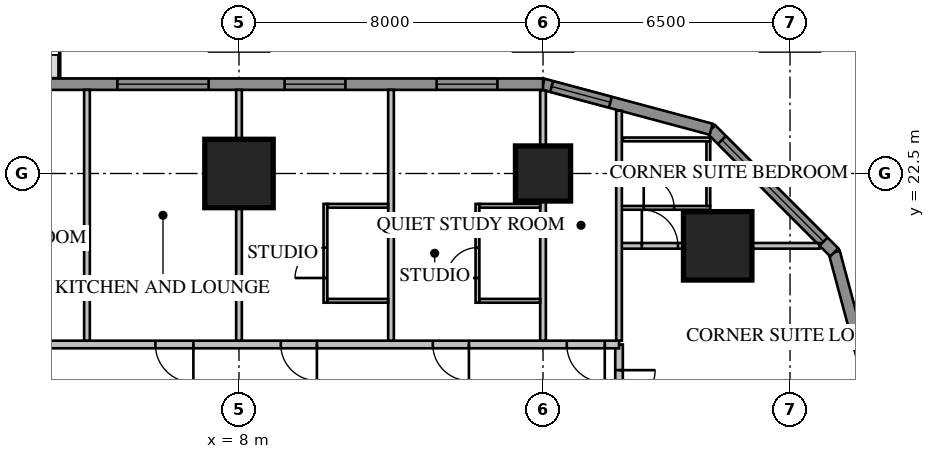
"""IFC4 building model, lengths in metres.
Left out: names, types, materials, properties, quantities, classifications, styles, units other than length and angle.
Written with IfcOpenShell. Run it as: python <this file> out.ifc"""

import sys

from ifc_helpers import new_model, si_unit, direction, frame, frame_2d, origin, origin_2d, place, context, subcontext, project, spatial, rectangle, extrude, element, fill, save


model = new_model("IFC4")
c1 = context("Model", 3, precision=1e-05, world=origin(), true_north=direction((0.0, 1.0)))
c2 = subcontext(c1, "Body", "Model", "MODEL_VIEW")
j1 = project(units=[si_unit("LENGTHUNIT", "METRE"), si_unit("PLANEANGLEUNIT", "RADIAN")], contexts=[c1])
p1 = place(None, origin())
s1 = spatial("IfcSite", under=j1, at=p1, CompositionType="ELEMENT")
p2 = place(p1, origin())
s2 = spatial("IfcBuilding", under=s1, at=p2, CompositionType="ELEMENT")
p3 = place(p2, frame((0.0, 0.0, 50.65)))
s3 = spatial("IfcBuildingStorey", under=s2, at=p3, CompositionType="ELEMENT", Elevation=50.65)
p4 = place(p3, frame((20.596, 20.596, 0.0), z_axis=(0.0, 0.0, 1.0), x_axis=(1.0, 0.0, 0.0)))
e1 = element("IfcColumn", 1, at=p4, inside=s3, PredefinedType="COLUMN", context=c2, shape_type="SweptSolid", body=[
    extrude(rectangle(XDim=1.8, YDim=1.8, at=origin_2d()), origin(), (0.0, 0.0, 1.0), 3.413),
])
p5 = place(p3, frame((16.0, 22.5, 0.0), z_axis=(0.0, 0.0, 1.0), x_axis=(1.0, 0.0, 0.0)))
e2 = element("IfcColumn", 2, at=p5, inside=s3, PredefinedType="COLUMN", context=c2, shape_type="SweptSolid", body=[
    extrude(rectangle(XDim=1.45, YDim=1.45, at=origin_2d()), origin(), (0.0, 0.0, 1.0), 3.413),
])
p6 = place(p3, frame((8.0, 22.5, 0.0), z_axis=(0.0, 0.0, 1.0), x_axis=(1.0, 0.0, 0.0)))
e3 = element("IfcColumn", 3, at=p6, inside=s3, PredefinedType="COLUMN", context=c2, shape_type="SweptSolid", body=[
    extrude(rectangle(XDim=1.8, YDim=1.8, at=origin_2d()), origin(), (0.0, 0.0, 1.0), 3.413),
])
p7 = place(p3, frame((24.85, 16.0, 0.0), z_axis=(0.0, 0.0, 1.0), x_axis=(-0.258839972501, 0.965920218567, 0.0)))
e4 = element("IfcWall", 4, at=p7, inside=s3, PredefinedType="SOLIDWALL", context=c2, shape_type="SweptSolid", body=[
    extrude(rectangle(XDim=4.581, YDim=0.3, at=frame_2d((2.291, 0.0))), origin(), (0.0, 0.0, 1.0), 3.65),
])
p8 = place(p3, frame((23.664, 20.425, 0.0), z_axis=(0.0, 0.0, 1.0), x_axis=(-0.707106781187, 0.707106781187, 0.0)))
e5 = element("IfcWall", 5, at=p8, inside=s3, PredefinedType="SOLIDWALL", context=c2, shape_type="SweptSolid", body=[
    extrude(rectangle(XDim=4.581, YDim=0.3, at=frame_2d((2.291, 0.0))), origin(), (0.0, 0.0, 1.0), 3.65),
])
p9 = place(p8, frame((0.4, 0.0, 0.75)))
e6 = element("IfcOpeningElement", 6, at=p9, cuts=e5, PredefinedType="OPENING", context=c2, shape_type="SweptSolid", body=[
    extrude(rectangle(XDim=3.781, YDim=1.8, at=frame_2d((1.891, 0.9))), frame((0.0, 0.17, 0.0), z_axis=(0.0, -1.0, 0.0), x_axis=(1.0, 0.0, 0.0)), (0.0, 0.0, 1.0), 0.34),
])
p10 = place(p3, frame((20.425, 23.664, 0.0), z_axis=(0.0, 0.0, 1.0), x_axis=(-0.965920218567, 0.258839972501, 0.0)))
e7 = element("IfcWall", 7, at=p10, inside=s3, PredefinedType="SOLIDWALL", context=c2, shape_type="SweptSolid", body=[
    extrude(rectangle(XDim=4.581, YDim=0.3, at=frame_2d((2.291, 0.0))), origin(), (0.0, 0.0, 1.0), 3.65),
])
p11 = place(p10, frame((2.746, 0.0, 0.75)))
e8 = element("IfcOpeningElement", 8, at=p11, cuts=e7, PredefinedType="OPENING", context=c2, shape_type="SweptSolid", body=[
    extrude(rectangle(XDim=1.6, YDim=1.8, at=frame_2d((0.8, 0.9))), frame((0.0, 0.17, 0.0), z_axis=(0.0, -1.0, 0.0), x_axis=(1.0, 0.0, 0.0)), (0.0, 0.0, 1.0), 0.34),
])
p12 = place(p3, frame((16.0, 24.85, 0.0), z_axis=(0.0, 0.0, 1.0), x_axis=(-1.0, 0.0, 0.0)))
e9 = element("IfcWall", 9, at=p12, inside=s3, PredefinedType="SOLIDWALL", context=c2, shape_type="SweptSolid", body=[
    extrude(rectangle(XDim=32.0, YDim=0.3, at=frame_2d((16.0, 0.0))), origin(), (0.0, 0.0, 1.0), 3.65),
])
p13 = place(p12, frame((1.2, 0.0, 0.75)))
e10 = element("IfcOpeningElement", 10, at=p13, cuts=e9, PredefinedType="OPENING", context=c2, shape_type="SweptSolid", body=[
    extrude(rectangle(XDim=1.6, YDim=1.8, at=frame_2d((0.8, 0.9))), frame((0.0, 0.17, 0.0), z_axis=(0.0, -1.0, 0.0), x_axis=(1.0, 0.0, 0.0)), (0.0, 0.0, 1.0), 0.34),
])
p14 = place(p12, frame((5.2, 0.0, 0.75)))
e11 = element("IfcOpeningElement", 11, at=p14, cuts=e9, PredefinedType="OPENING", context=c2, shape_type="SweptSolid", body=[
    extrude(rectangle(XDim=1.6, YDim=1.8, at=frame_2d((0.8, 0.9))), frame((0.0, 0.17, 0.0), z_axis=(0.0, -1.0, 0.0), x_axis=(1.0, 0.0, 0.0)), (0.0, 0.0, 1.0), 0.34),
])
p15 = place(p12, frame((17.2, 0.0, 0.75)))
e12 = element("IfcOpeningElement", 12, at=p15, cuts=e9, PredefinedType="OPENING", context=c2, shape_type="SweptSolid", body=[
    extrude(rectangle(XDim=1.6, YDim=1.8, at=frame_2d((0.8, 0.9))), frame((0.0, 0.17, 0.0), z_axis=(0.0, -1.0, 0.0), x_axis=(1.0, 0.0, 0.0)), (0.0, 0.0, 1.0), 0.34),
])
p16 = place(p12, frame((21.2, 0.0, 0.75)))
e13 = element("IfcOpeningElement", 13, at=p16, cuts=e9, PredefinedType="OPENING", context=c2, shape_type="SweptSolid", body=[
    extrude(rectangle(XDim=1.6, YDim=1.8, at=frame_2d((0.8, 0.9))), frame((0.0, 0.17, 0.0), z_axis=(0.0, -1.0, 0.0), x_axis=(1.0, 0.0, 0.0)), (0.0, 0.0, 1.0), 0.34),
])
p17 = place(p12, frame((25.2, 0.0, 0.75)))
e14 = element("IfcOpeningElement", 14, at=p17, cuts=e9, PredefinedType="OPENING", context=c2, shape_type="SweptSolid", body=[
    extrude(rectangle(XDim=1.6, YDim=1.8, at=frame_2d((0.8, 0.9))), frame((0.0, 0.17, 0.0), z_axis=(0.0, -1.0, 0.0), x_axis=(1.0, 0.0, 0.0)), (0.0, 0.0, 1.0), 0.34),
])
p18 = place(p12, frame((29.2, 0.0, 0.75)))
e15 = element("IfcOpeningElement", 15, at=p18, cuts=e9, PredefinedType="OPENING", context=c2, shape_type="SweptSolid", body=[
    extrude(rectangle(XDim=1.6, YDim=1.8, at=frame_2d((0.8, 0.9))), frame((0.0, 0.17, 0.0), z_axis=(0.0, -1.0, 0.0), x_axis=(1.0, 0.0, 0.0)), (0.0, 0.0, 1.0), 0.34),
])
p19 = place(p12, frame((8.8, 0.0, 0.75)))
e16 = element("IfcOpeningElement", 16, at=p19, cuts=e9, PredefinedType="OPENING", context=c2, shape_type="SweptSolid", body=[
    extrude(rectangle(XDim=2.4, YDim=1.8, at=frame_2d((1.2, 0.9))), frame((0.0, 0.17, 0.0), z_axis=(0.0, -1.0, 0.0), x_axis=(1.0, 0.0, 0.0)), (0.0, 0.0, 1.0), 0.34),
])
p20 = place(p12, frame((13.812, 0.0, 0.0)))
e17 = element("IfcOpeningElement", 17, at=p20, cuts=e9, PredefinedType="OPENING", context=c2, shape_type="SweptSolid", body=[
    extrude(rectangle(XDim=1.0, YDim=2.4, at=frame_2d((0.5, 1.2))), frame((0.0, 0.17, 0.0), z_axis=(0.0, -1.0, 0.0), x_axis=(1.0, 0.0, 0.0)), (0.0, 0.0, 1.0), 0.34),
])
p21 = place(p3, frame((18.0, -18.0, 0.0), z_axis=(0.0, 0.0, 1.0), x_axis=(0.0, 1.0, 0.0)))
e18 = element("IfcWall", 18, at=p21, inside=s3, PredefinedType="PARTITIONING", context=c2, shape_type="SweptSolid", body=[
    extrude(rectangle(XDim=36.0, YDim=0.2, at=frame_2d((18.0, 0.0))), origin(), (0.0, 0.0, 1.0), 3.65),
])
p22 = place(p21, frame((10.4, 0.0, 0.0)))
e19 = element("IfcOpeningElement", 19, at=p22, cuts=e18, PredefinedType="OPENING", context=c2, shape_type="SweptSolid", body=[
    extrude(rectangle(XDim=1.0, YDim=2.1, at=frame_2d((0.5, 1.05))), frame((0.0, 0.12, 0.0), z_axis=(0.0, -1.0, 0.0), x_axis=(1.0, 0.0, 0.0)), (0.0, 0.0, 1.0), 0.24),
])
p23 = place(p21, frame((14.4, 0.0, 0.0)))
e20 = element("IfcOpeningElement", 20, at=p23, cuts=e18, PredefinedType="OPENING", context=c2, shape_type="SweptSolid", body=[
    extrude(rectangle(XDim=1.0, YDim=2.1, at=frame_2d((0.5, 1.05))), frame((0.0, 0.12, 0.0), z_axis=(0.0, -1.0, 0.0), x_axis=(1.0, 0.0, 0.0)), (0.0, 0.0, 1.0), 0.24),
])
p24 = place(p21, frame((0.375, 0.0, 0.0)))
e21 = element("IfcOpeningElement", 21, at=p24, cuts=e18, PredefinedType="OPENING", context=c2, shape_type="SweptSolid", body=[
    extrude(rectangle(XDim=1.0, YDim=2.1, at=frame_2d((0.5, 1.05))), frame((0.0, 0.12, 0.0), z_axis=(0.0, -1.0, 0.0), x_axis=(1.0, 0.0, 0.0)), (0.0, 0.0, 1.0), 0.24),
])
p25 = place(p21, frame((34.375, 0.0, 0.0)))
e22 = element("IfcOpeningElement", 22, at=p25, cuts=e18, PredefinedType="OPENING", context=c2, shape_type="SweptSolid", body=[
    extrude(rectangle(XDim=0.95, YDim=2.1, at=frame_2d((0.475, 1.05))), frame((0.0, 0.12, 0.0), z_axis=(0.0, -1.0, 0.0), x_axis=(1.0, 0.0, 0.0)), (0.0, 0.0, 1.0), 0.24),
])
p26 = place(p3, frame((18.065, 21.596, 0.0), z_axis=(0.0, 0.0, 1.0), x_axis=(1.0, 0.0, 0.0)))
e23 = element("IfcWall", 23, at=p26, inside=s3, PredefinedType="PARTITIONING", context=c2, shape_type="SweptSolid", body=[
    extrude(rectangle(XDim=2.335, YDim=0.1, at=frame_2d((1.167, 0.0))), origin(), (0.0, 0.0, 1.0), 3.65),
])
p27 = place(p26, frame((0.585, 0.0, 0.0)))
e24 = element("IfcOpeningElement", 24, at=p27, cuts=e23, PredefinedType="OPENING", context=c2, shape_type="SweptSolid", body=[
    extrude(rectangle(XDim=0.8, YDim=2.1, at=frame_2d((0.4, 1.05))), frame((0.0, 0.07, 0.0), z_axis=(0.0, -1.0, 0.0), x_axis=(1.0, 0.0, 0.0)), (0.0, 0.0, 1.0), 0.14),
])
p28 = place(p3, frame((20.35, 21.646, 0.0), z_axis=(0.0, 0.0, 1.0), x_axis=(0.0, 1.0, 0.0)))
e25 = element("IfcWall", 25, at=p28, inside=s3, PredefinedType="PARTITIONING", context=c2, shape_type="SweptSolid", body=[
    extrude(rectangle(XDim=1.7, YDim=0.1, at=frame_2d((0.85, 0.0))), origin(), (0.0, 0.0, 1.0), 3.65),
])
p29 = place(p3, frame((18.1, 23.396, 0.0), z_axis=(0.0, 0.0, 1.0), x_axis=(1.0, 0.0, 0.0)))
e26 = element("IfcWall", 26, at=p29, inside=s3, PredefinedType="PARTITIONING", context=c2, shape_type="SweptSolid", body=[
    extrude(rectangle(XDim=2.3, YDim=0.1, at=frame_2d((1.15, 0.0))), origin(), (0.0, 0.0, 1.0), 3.65),
])
p30 = place(p3, frame((18.065, 20.596, 0.0), z_axis=(0.0, 0.0, 1.0), x_axis=(1.0, 0.0, 0.0)))
e27 = element("IfcWall", 27, at=p30, inside=s3, PredefinedType="PARTITIONING", context=c2, shape_type="SweptSolid", body=[
    extrude(rectangle(XDim=5.209, YDim=0.15, at=frame_2d((2.604, 0.0))), origin(), (0.0, 0.0, 1.0), 3.65),
])
p31 = place(p30, frame((0.535, 0.0, 0.0)))
e28 = element("IfcOpeningElement", 28, at=p31, cuts=e27, PredefinedType="OPENING", context=c2, shape_type="SweptSolid", body=[
    extrude(rectangle(XDim=0.95, YDim=2.1, at=frame_2d((0.475, 1.05))), frame((0.0, 0.095, 0.0), z_axis=(0.0, -1.0, 0.0), x_axis=(1.0, 0.0, 0.0)), (0.0, 0.0, 1.0), 0.19),
])
p32 = place(p3, frame((18.0, 18.0, 0.0), z_axis=(0.0, 0.0, 1.0), x_axis=(-1.0, 0.0, 0.0)))
e29 = element("IfcWall", 29, at=p32, inside=s3, PredefinedType="PARTITIONING", context=c2, shape_type="SweptSolid", body=[
    extrude(rectangle(XDim=36.0, YDim=0.2, at=frame_2d((18.0, 0.0))), origin(), (0.0, 0.0, 1.0), 3.65),
])
p33 = place(p32, frame((0.375, 0.0, 0.0)))
e30 = element("IfcOpeningElement", 30, at=p33, cuts=e29, PredefinedType="OPENING", context=c2, shape_type="SweptSolid", body=[
    extrude(rectangle(XDim=1.0, YDim=2.1, at=frame_2d((0.5, 1.05))), frame((0.0, 0.12, 0.0), z_axis=(0.0, -1.0, 0.0), x_axis=(1.0, 0.0, 0.0)), (0.0, 0.0, 1.0), 0.24),
])
p34 = place(p32, frame((3.95, 0.0, 0.0)))
e31 = element("IfcOpeningElement", 31, at=p34, cuts=e29, PredefinedType="OPENING", context=c2, shape_type="SweptSolid", body=[
    extrude(rectangle(XDim=0.95, YDim=2.1, at=frame_2d((0.475, 1.05))), frame((0.0, 0.12, 0.0), z_axis=(0.0, -1.0, 0.0), x_axis=(1.0, 0.0, 0.0)), (0.0, 0.0, 1.0), 0.24),
])
p35 = place(p32, frame((7.95, 0.0, 0.0)))
e32 = element("IfcOpeningElement", 32, at=p35, cuts=e29, PredefinedType="OPENING", context=c2, shape_type="SweptSolid", body=[
    extrude(rectangle(XDim=0.95, YDim=2.1, at=frame_2d((0.475, 1.05))), frame((0.0, 0.12, 0.0), z_axis=(0.0, -1.0, 0.0), x_axis=(1.0, 0.0, 0.0)), (0.0, 0.0, 1.0), 0.24),
])
p36 = place(p32, frame((19.95, 0.0, 0.0)))
e33 = element("IfcOpeningElement", 33, at=p36, cuts=e29, PredefinedType="OPENING", context=c2, shape_type="SweptSolid", body=[
    extrude(rectangle(XDim=0.95, YDim=2.1, at=frame_2d((0.475, 1.05))), frame((0.0, 0.12, 0.0), z_axis=(0.0, -1.0, 0.0), x_axis=(1.0, 0.0, 0.0)), (0.0, 0.0, 1.0), 0.24),
])
p37 = place(p32, frame((23.95, 0.0, 0.0)))
e34 = element("IfcOpeningElement", 34, at=p37, cuts=e29, PredefinedType="OPENING", context=c2, shape_type="SweptSolid", body=[
    extrude(rectangle(XDim=0.95, YDim=2.1, at=frame_2d((0.475, 1.05))), frame((0.0, 0.12, 0.0), z_axis=(0.0, -1.0, 0.0), x_axis=(1.0, 0.0, 0.0)), (0.0, 0.0, 1.0), 0.24),
])
p38 = place(p32, frame((27.95, 0.0, 0.0)))
e35 = element("IfcOpeningElement", 35, at=p38, cuts=e29, PredefinedType="OPENING", context=c2, shape_type="SweptSolid", body=[
    extrude(rectangle(XDim=0.95, YDim=2.1, at=frame_2d((0.475, 1.05))), frame((0.0, 0.12, 0.0), z_axis=(0.0, -1.0, 0.0), x_axis=(1.0, 0.0, 0.0)), (0.0, 0.0, 1.0), 0.24),
])
p39 = place(p32, frame((31.95, 0.0, 0.0)))
e36 = element("IfcOpeningElement", 36, at=p39, cuts=e29, PredefinedType="OPENING", context=c2, shape_type="SweptSolid", body=[
    extrude(rectangle(XDim=0.95, YDim=2.1, at=frame_2d((0.475, 1.05))), frame((0.0, 0.12, 0.0), z_axis=(0.0, -1.0, 0.0), x_axis=(1.0, 0.0, 0.0)), (0.0, 0.0, 1.0), 0.24),
])
p40 = place(p32, frame((34.375, 0.0, 0.0)))
e37 = element("IfcOpeningElement", 37, at=p40, cuts=e29, PredefinedType="OPENING", context=c2, shape_type="SweptSolid", body=[
    extrude(rectangle(XDim=0.95, YDim=2.1, at=frame_2d((0.475, 1.05))), frame((0.0, 0.12, 0.0), z_axis=(0.0, -1.0, 0.0), x_axis=(1.0, 0.0, 0.0)), (0.0, 0.0, 1.0), 0.24),
])
p41 = place(p32, frame((11.2, 0.0, 0.0)))
e38 = element("IfcOpeningElement", 38, at=p41, cuts=e29, PredefinedType="OPENING", context=c2, shape_type="SweptSolid", body=[
    extrude(rectangle(XDim=1.0, YDim=2.1, at=frame_2d((0.5, 1.05))), frame((0.0, 0.12, 0.0), z_axis=(0.0, -1.0, 0.0), x_axis=(1.0, 0.0, 0.0)), (0.0, 0.0, 1.0), 0.24),
])
p42 = place(p32, frame((15.2, 0.0, 0.0)))
e39 = element("IfcOpeningElement", 39, at=p42, cuts=e29, PredefinedType="OPENING", context=c2, shape_type="SweptSolid", body=[
    extrude(rectangle(XDim=1.0, YDim=2.1, at=frame_2d((0.5, 1.05))), frame((0.0, 0.12, 0.0), z_axis=(0.0, -1.0, 0.0), x_axis=(1.0, 0.0, 0.0)), (0.0, 0.0, 1.0), 0.24),
])
p43 = place(p3, frame((18.0, 18.1, 0.0), z_axis=(0.0, 0.0, 1.0), x_axis=(0.0, 1.0, 0.0)))
e40 = element("IfcWall", 40, at=p43, inside=s3, PredefinedType="PARTITIONING", context=c2, shape_type="SweptSolid", body=[
    extrude(rectangle(XDim=6.053, YDim=0.15, at=frame_2d((3.027, 0.0))), origin(), (0.0, 0.0, 1.0), 3.65),
])
p44 = place(p3, frame((16.0, 18.1, 0.0), z_axis=(0.0, 0.0, 1.0), x_axis=(0.0, 1.0, 0.0)))
e41 = element("IfcWall", 41, at=p44, inside=s3, PredefinedType="PARTITIONING", context=c2, shape_type="SweptSolid", body=[
    extrude(rectangle(XDim=6.589, YDim=0.15, at=frame_2d((3.295, 0.0))), origin(), (0.0, 0.0, 1.0), 3.65),
])
for number, where, z_axis, x_axis in (
    (42, (12.0, 18.1, 0.0), (0.0, 0.0, 1.0), (0.0, 1.0, 0.0)),
    (43, (8.0, 18.1, 0.0), (0.0, 0.0, 1.0), (0.0, 1.0, 0.0)),
    (44, (4.0, 18.1, 0.0), (0.0, 0.0, 1.0), (0.0, 1.0, 0.0)),
):
    element("IfcWall", number, at=place(p3, frame(where, z_axis=z_axis, x_axis=x_axis)), inside=s3, PredefinedType="PARTITIONING", context=c2, shape_type="SweptSolid", body=[
        extrude(rectangle(XDim=6.6, YDim=0.15, at=frame_2d((3.3, 0.0))), origin(), (0.0, 0.0, 1.0), 3.65),
    ])
p45 = place(p3, frame((14.275, 19.1, 0.0), z_axis=(0.0, 0.0, 1.0), x_axis=(0.0, 1.0, 0.0)))
e45 = element("IfcWall", 45, at=p45, inside=s3, PredefinedType="PARTITIONING", context=c2, shape_type="SweptSolid", body=[
    extrude(rectangle(XDim=2.6, YDim=0.1, at=frame_2d((1.3, 0.0))), origin(), (0.0, 0.0, 1.0), 3.65),
])
p46 = place(p45, frame((0.65, 0.0, 0.0)))
e46 = element("IfcOpeningElement", 46, at=p46, cuts=e45, PredefinedType="OPENING", context=c2, shape_type="SweptSolid", body=[
    extrude(rectangle(XDim=0.8, YDim=2.1, at=frame_2d((0.4, 1.05))), frame((0.0, 0.07, 0.0), z_axis=(0.0, -1.0, 0.0), x_axis=(1.0, 0.0, 0.0)), (0.0, 0.0, 1.0), 0.14),
])
p47 = place(p3, frame((15.925, 21.65, 0.0), z_axis=(0.0, 0.0, 1.0), x_axis=(-1.0, 0.0, 0.0)))
e47 = element("IfcWall", 47, at=p47, inside=s3, PredefinedType="PARTITIONING", context=c2, shape_type="SweptSolid", body=[
    extrude(rectangle(XDim=1.6, YDim=0.1, at=frame_2d((0.8, 0.0))), origin(), (0.0, 0.0, 1.0), 3.65),
])
p48 = place(p3, frame((15.925, 19.15, 0.0), z_axis=(0.0, 0.0, 1.0), x_axis=(-1.0, 0.0, 0.0)))
e48 = element("IfcWall", 48, at=p48, inside=s3, PredefinedType="PARTITIONING", context=c2, shape_type="SweptSolid", body=[
    extrude(rectangle(XDim=1.6, YDim=0.1, at=frame_2d((0.8, 0.0))), origin(), (0.0, 0.0, 1.0), 3.038),
])
p49 = place(p3, frame((10.275, 19.1, 0.0), z_axis=(0.0, 0.0, 1.0), x_axis=(0.0, 1.0, 0.0)))
e49 = element("IfcWall", 49, at=p49, inside=s3, PredefinedType="PARTITIONING", context=c2, shape_type="SweptSolid", body=[
    extrude(rectangle(XDim=2.6, YDim=0.1, at=frame_2d((1.3, 0.0))), origin(), (0.0, 0.0, 1.0), 3.65),
])
p50 = place(p49, frame((0.65, 0.0, 0.0)))
e50 = element("IfcOpeningElement", 50, at=p50, cuts=e49, PredefinedType="OPENING", context=c2, shape_type="SweptSolid", body=[
    extrude(rectangle(XDim=0.8, YDim=2.1, at=frame_2d((0.4, 1.05))), frame((0.0, 0.07, 0.0), z_axis=(0.0, -1.0, 0.0), x_axis=(1.0, 0.0, 0.0)), (0.0, 0.0, 1.0), 0.14),
])
p51 = place(p3, frame((11.925, 21.65, 0.0), z_axis=(0.0, 0.0, 1.0), x_axis=(-1.0, 0.0, 0.0)))
e51 = element("IfcWall", 51, at=p51, inside=s3, PredefinedType="PARTITIONING", context=c2, shape_type="SweptSolid", body=[
    extrude(rectangle(XDim=1.6, YDim=0.1, at=frame_2d((0.8, 0.0))), origin(), (0.0, 0.0, 1.0), 3.65),
])
p52 = place(p3, frame((11.925, 19.15, 0.0), z_axis=(0.0, 0.0, 1.0), x_axis=(-1.0, 0.0, 0.0)))
e52 = element("IfcWall", 52, at=p52, inside=s3, PredefinedType="PARTITIONING", context=c2, shape_type="SweptSolid", body=[
    extrude(rectangle(XDim=1.6, YDim=0.1, at=frame_2d((0.8, 0.0))), origin(), (0.0, 0.0, 1.0), 3.038),
])
p53 = place(p9, origin())
e53 = element("IfcWindow", 53, at=p53, inside=s3, PartitioningType="SINGLE_PANEL", PredefinedType="WINDOW", context=c2, shape_type="SweptSolid", body=[
    extrude(rectangle(XDim=3.781, YDim=1.8, at=frame_2d((1.891, 0.9))), frame((0.0, 0.03, 0.0), z_axis=(0.0, -1.0, 0.0), x_axis=(1.0, 0.0, 0.0)), (0.0, 0.0, 1.0), 0.06),
])
fill(e6, e53)
p54 = place(p11, origin())
e54 = element("IfcWindow", 54, at=p54, inside=s3, PartitioningType="SINGLE_PANEL", PredefinedType="WINDOW", context=c2, shape_type="SweptSolid", body=[
    extrude(rectangle(XDim=1.6, YDim=1.8, at=frame_2d((0.8, 0.9))), frame((0.0, 0.03, 0.0), z_axis=(0.0, -1.0, 0.0), x_axis=(1.0, 0.0, 0.0)), (0.0, 0.0, 1.0), 0.06),
])
fill(e8, e54)
p55 = place(p13, origin())
e55 = element("IfcWindow", 55, at=p55, inside=s3, PartitioningType="SINGLE_PANEL", PredefinedType="WINDOW", context=c2, shape_type="SweptSolid", body=[
    extrude(rectangle(XDim=1.6, YDim=1.8, at=frame_2d((0.8, 0.9))), frame((0.0, 0.03, 0.0), z_axis=(0.0, -1.0, 0.0), x_axis=(1.0, 0.0, 0.0)), (0.0, 0.0, 1.0), 0.06),
])
fill(e10, e55)
p56 = place(p14, origin())
e56 = element("IfcWindow", 56, at=p56, inside=s3, PartitioningType="SINGLE_PANEL", PredefinedType="WINDOW", context=c2, shape_type="SweptSolid", body=[
    extrude(rectangle(XDim=1.6, YDim=1.8, at=frame_2d((0.8, 0.9))), frame((0.0, 0.03, 0.0), z_axis=(0.0, -1.0, 0.0), x_axis=(1.0, 0.0, 0.0)), (0.0, 0.0, 1.0), 0.06),
])
fill(e11, e56)
p57 = place(p19, origin())
e57 = element("IfcWindow", 57, at=p57, inside=s3, PartitioningType="SINGLE_PANEL", PredefinedType="WINDOW", context=c2, shape_type="SweptSolid", body=[
    extrude(rectangle(XDim=2.4, YDim=1.8, at=frame_2d((1.2, 0.9))), frame((0.0, 0.03, 0.0), z_axis=(0.0, -1.0, 0.0), x_axis=(1.0, 0.0, 0.0)), (0.0, 0.0, 1.0), 0.06),
])
fill(e16, e57)
p58 = place(p25, origin())
e58 = element("IfcDoor", 58, at=p58, inside=s3, OperationType="SINGLE_SWING_RIGHT", PredefinedType="DOOR", context=c2, shape_type="SweptSolid", body=[
    extrude(rectangle(XDim=0.95, YDim=2.1, at=frame_2d((0.475, 1.05))), frame((0.0, 0.025, 0.0), z_axis=(0.0, -1.0, 0.0), x_axis=(1.0, 0.0, 0.0)), (0.0, 0.0, 1.0), 0.05),
])
fill(e22, e58)
p59 = place(p27, origin())
e59 = element("IfcDoor", 59, at=p59, inside=s3, OperationType="SINGLE_SWING_LEFT", PredefinedType="DOOR", context=c2, shape_type="SweptSolid", body=[
    extrude(rectangle(XDim=0.8, YDim=2.1, at=frame_2d((0.4, 1.05))), frame((0.0, 0.025, 0.0), z_axis=(0.0, -1.0, 0.0), x_axis=(1.0, 0.0, 0.0)), (0.0, 0.0, 1.0), 0.05),
])
fill(e24, e59)
p60 = place(p31, origin())
e60 = element("IfcDoor", 60, at=p60, inside=s3, OperationType="SINGLE_SWING_LEFT", PredefinedType="DOOR", context=c2, shape_type="SweptSolid", body=[
    extrude(rectangle(XDim=0.95, YDim=2.1, at=frame_2d((0.475, 1.05))), frame((0.0, 0.025, 0.0), z_axis=(0.0, -1.0, 0.0), x_axis=(1.0, 0.0, 0.0)), (0.0, 0.0, 1.0), 0.05),
])
fill(e28, e60)
p61 = place(p33, origin())
e61 = element("IfcDoor", 61, at=p61, inside=s3, OperationType="SINGLE_SWING_LEFT", PredefinedType="DOOR", context=c2, shape_type="SweptSolid", body=[
    extrude(rectangle(XDim=1.0, YDim=2.1, at=frame_2d((0.5, 1.05))), frame((0.0, 0.025, 0.0), z_axis=(0.0, -1.0, 0.0), x_axis=(1.0, 0.0, 0.0)), (0.0, 0.0, 1.0), 0.05),
])
fill(e30, e61)
p62 = place(p34, origin())
e62 = element("IfcDoor", 62, at=p62, inside=s3, OperationType="SINGLE_SWING_LEFT", PredefinedType="DOOR", context=c2, shape_type="SweptSolid", body=[
    extrude(rectangle(XDim=0.95, YDim=2.1, at=frame_2d((0.475, 1.05))), frame((0.0, 0.025, 0.0), z_axis=(0.0, -1.0, 0.0), x_axis=(1.0, 0.0, 0.0)), (0.0, 0.0, 1.0), 0.05),
])
fill(e31, e62)
p63 = place(p46, origin())
e63 = element("IfcDoor", 63, at=p63, inside=s3, OperationType="SINGLE_SWING_LEFT", PredefinedType="DOOR", context=c2, shape_type="SweptSolid", body=[
    extrude(rectangle(XDim=0.8, YDim=2.1, at=frame_2d((0.4, 1.05))), frame((0.0, 0.025, 0.0), z_axis=(0.0, -1.0, 0.0), x_axis=(1.0, 0.0, 0.0)), (0.0, 0.0, 1.0), 0.05),
])
fill(e46, e63)
p64 = place(p35, origin())
e64 = element("IfcDoor", 64, at=p64, inside=s3, OperationType="SINGLE_SWING_LEFT", PredefinedType="DOOR", context=c2, shape_type="SweptSolid", body=[
    extrude(rectangle(XDim=0.95, YDim=2.1, at=frame_2d((0.475, 1.05))), frame((0.0, 0.025, 0.0), z_axis=(0.0, -1.0, 0.0), x_axis=(1.0, 0.0, 0.0)), (0.0, 0.0, 1.0), 0.05),
])
fill(e32, e64)
p65 = place(p50, origin())
e65 = element("IfcDoor", 65, at=p65, inside=s3, OperationType="SINGLE_SWING_LEFT", PredefinedType="DOOR", context=c2, shape_type="SweptSolid", body=[
    extrude(rectangle(XDim=0.8, YDim=2.1, at=frame_2d((0.4, 1.05))), frame((0.0, 0.025, 0.0), z_axis=(0.0, -1.0, 0.0), x_axis=(1.0, 0.0, 0.0)), (0.0, 0.0, 1.0), 0.05),
])
fill(e50, e65)
p66 = place(p41, origin())
e66 = element("IfcDoor", 66, at=p66, inside=s3, OperationType="SINGLE_SWING_LEFT", PredefinedType="DOOR", context=c2, shape_type="SweptSolid", body=[
    extrude(rectangle(XDim=1.0, YDim=2.1, at=frame_2d((0.5, 1.05))), frame((0.0, 0.025, 0.0), z_axis=(0.0, -1.0, 0.0), x_axis=(1.0, 0.0, 0.0)), (0.0, 0.0, 1.0), 0.05),
])
fill(e38, e66)
save(model, sys.argv[1])
